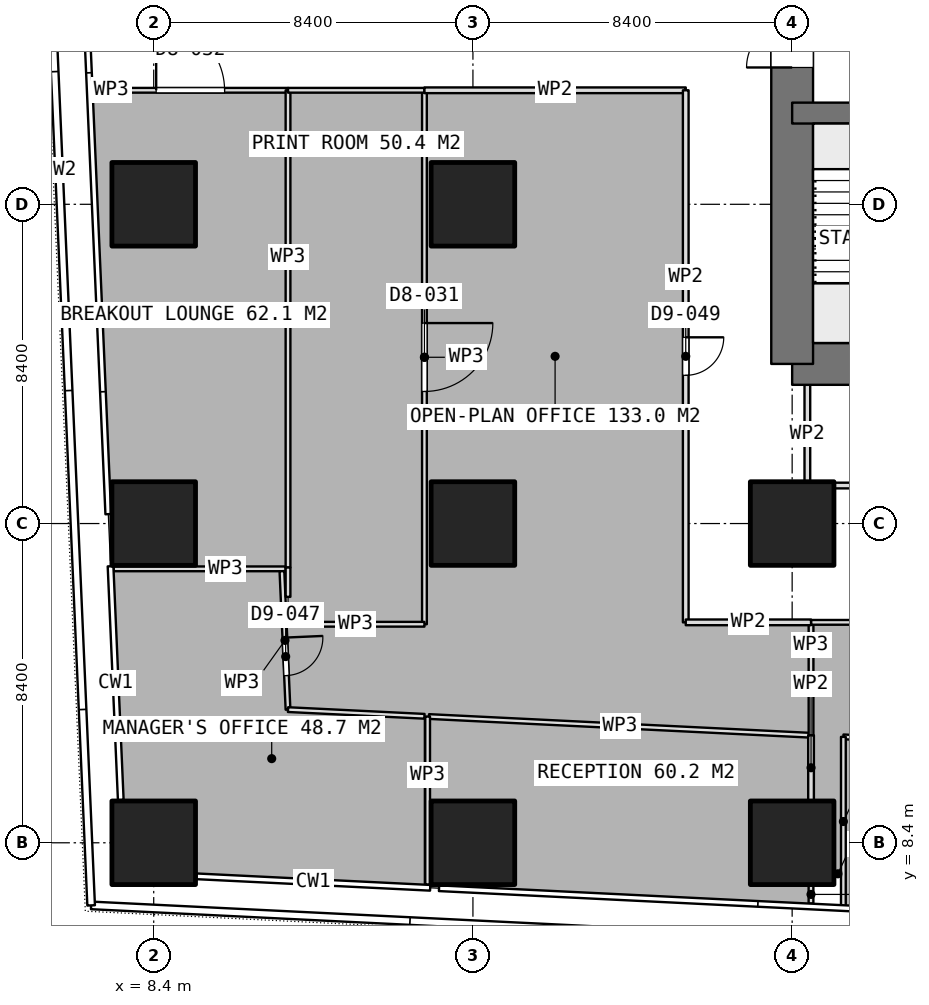
"""IFC4 building model, lengths in metres.
Left out: names, types, materials, properties, quantities, classifications, styles, units other than length and angle.
Written with IfcOpenShell. Run it as: python <this file> out.ifc"""

import sys

from ifc_helpers import new_model, si_unit, direction, frame, frame_2d, origin, origin_2d, place, context, subcontext, project, spatial, rectangle, extrude, element, fill, save


model = new_model("IFC4")
c1 = context("Model", 3, precision=1e-05, world=origin(), true_north=direction((0.0, 1.0)))
c2 = subcontext(c1, "Body", "Model", "MODEL_VIEW")
j1 = project(units=[si_unit("LENGTHUNIT", "METRE"), si_unit("PLANEANGLEUNIT", "RADIAN")], contexts=[c1])
p1 = place(None, origin())
s1 = spatial("IfcSite", under=j1, at=p1, CompositionType="ELEMENT")
p2 = place(p1, origin())
s2 = spatial("IfcBuilding", under=s1, at=p2, CompositionType="ELEMENT")
p3 = place(p2, frame((0.0, 0.0, 32.9)))
s3 = spatial("IfcBuildingStorey", under=s2, at=p3, CompositionType="ELEMENT", Elevation=32.9)
p4 = place(p3, frame((25.2, 21.0, 0.0), z_axis=(0.0, 0.0, 1.0), x_axis=(1.0, 0.0, 0.0)))
e1 = element("IfcWall", 1, at=p4, inside=s3, PredefinedType="SHEAR", context=c2, shape_type="SweptSolid", body=[
    extrude(rectangle(XDim=10.4, YDim=1.1, at=frame_2d((5.2, 0.0))), origin(), (0.0, 0.0, 1.0), 3.75),
])
p5 = place(p3, frame((25.2, 21.0, 0.0), z_axis=(0.0, 0.0, 1.0), x_axis=(0.0, 1.0, 0.0)))
e2 = element("IfcWall", 2, at=p5, inside=s3, PredefinedType="SHEAR", context=c2, shape_type="SweptSolid", body=[
    extrude(rectangle(XDim=25.2, YDim=1.1, at=frame_2d((12.6, 0.0))), origin(), (0.0, 0.0, 1.0), 3.75),
])
p6 = place(p5, frame((7.8, 0.0, 0.0)))
e3 = element("IfcOpeningElement", 3, at=p6, cuts=e2, PredefinedType="OPENING", context=c2, shape_type="SweptSolid", body=[
    extrude(rectangle(XDim=1.2, YDim=2.1, at=frame_2d((0.6, 1.05))), frame((0.0, 0.56, 0.0), z_axis=(0.0, -1.0, 0.0), x_axis=(1.0, 0.0, 0.0)), (0.0, 0.0, 1.0), 1.12),
])
p7 = place(p5, frame((14.25, 0.0, 0.0)))
e4 = element("IfcOpeningElement", 4, at=p7, cuts=e2, PredefinedType="OPENING", context=c2, shape_type="SweptSolid", body=[
    extrude(rectangle(XDim=0.9, YDim=2.1, at=frame_2d((0.45, 1.05))), frame((0.0, 0.56, 0.0), z_axis=(0.0, -1.0, 0.0), x_axis=(1.0, 0.0, 0.0)), (0.0, 0.0, 1.0), 1.12),
])
p8 = place(p5, frame((16.85, 0.0, 0.0)))
e5 = element("IfcOpeningElement", 5, at=p8, cuts=e2, PredefinedType="OPENING", context=c2, shape_type="SweptSolid", body=[
    extrude(rectangle(XDim=0.9, YDim=2.1, at=frame_2d((0.45, 1.05))), frame((0.0, 0.56, 0.0), z_axis=(0.0, -1.0, 0.0), x_axis=(1.0, 0.0, 0.0)), (0.0, 0.0, 1.0), 1.12),
])
p9 = place(p5, frame((19.075, 0.0, 0.0)))
e6 = element("IfcOpeningElement", 6, at=p9, cuts=e2, PredefinedType="OPENING", context=c2, shape_type="SweptSolid", body=[
    extrude(rectangle(XDim=1.2, YDim=2.1, at=frame_2d((0.6, 1.05))), frame((0.0, 0.56, 0.0), z_axis=(0.0, -1.0, 0.0), x_axis=(1.0, 0.0, 0.0)), (0.0, 0.0, 1.0), 1.12),
])
p10 = place(p3, frame((25.2, 27.6, 0.0), z_axis=(0.0, 0.0, 1.0), x_axis=(1.0, 0.0, 0.0)))
e7 = element("IfcWall", 7, at=p10, inside=s3, PredefinedType="SHEAR", context=c2, shape_type="SweptSolid", body=[
    extrude(rectangle(XDim=6.6, YDim=0.55, at=frame_2d((3.3, 0.0))), origin(), (0.0, 0.0, 1.0), 3.75),
])
p11 = place(p10, frame((4.925, 0.0, 0.0)))
e8 = element("IfcOpeningElement", 8, at=p11, cuts=e7, PredefinedType="OPENING", context=c2, shape_type="SweptSolid", body=[
    extrude(rectangle(XDim=1.2, YDim=2.1, at=frame_2d((0.6, 1.05))), frame((0.0, 0.285, 0.0), z_axis=(0.0, -1.0, 0.0), x_axis=(1.0, 0.0, 0.0)), (0.0, 0.0, 1.0), 0.57),
])
for number, where, z_axis, x_axis in (
    (9, (8.4, 8.4, 0.0), (0.0, 0.0, 1.0), (1.0, 0.0, 0.0)),
    (10, (8.4, 16.8, 0.0), (0.0, 0.0, 1.0), (1.0, 0.0, 0.0)),
    (11, (8.4, 25.2, 0.0), (0.0, 0.0, 1.0), (1.0, 0.0, 0.0)),
    (12, (16.8, 8.4, 0.0), (0.0, 0.0, 1.0), (1.0, 0.0, 0.0)),
    (13, (16.8, 16.8, 0.0), (0.0, 0.0, 1.0), (1.0, 0.0, 0.0)),
    (14, (16.8, 25.2, 0.0), (0.0, 0.0, 1.0), (1.0, 0.0, 0.0)),
    (15, (25.2, 8.4, 0.0), (0.0, 0.0, 1.0), (1.0, 0.0, 0.0)),
    (16, (25.2, 16.8, 0.0), (0.0, 0.0, 1.0), (1.0, 0.0, 0.0)),
):
    element("IfcColumn", number, at=place(p3, frame(where, z_axis=z_axis, x_axis=x_axis)), inside=s3, PredefinedType="COLUMN", context=c2, shape_type="SweptSolid", body=[
        extrude(rectangle(XDim=2.2, YDim=2.2, at=origin_2d()), origin(), (0.0, 0.0, 1.0), 3.75),
    ])
p12 = place(p3, frame((25.525, 17.8, 0.0), z_axis=(0.0, 0.0, 1.0), x_axis=(1.0, 0.0, 0.0)))
e17 = element("IfcWall", 17, at=p12, inside=s3, PredefinedType="PARTITIONING", context=c2, shape_type="SweptSolid", body=[
    extrude(rectangle(XDim=9.75, YDim=0.15, at=frame_2d((4.875, 0.0))), origin(), (0.0, 0.0, 1.0), 3.5),
])
p13 = place(p12, frame((4.375, 0.0, 0.0)))
e18 = element("IfcOpeningElement", 18, at=p13, cuts=e17, PredefinedType="OPENING", context=c2, shape_type="SweptSolid", body=[
    extrude(rectangle(XDim=1.0, YDim=2.1, at=frame_2d((0.5, 1.05))), frame((0.0, 0.085, 0.0), z_axis=(0.0, -1.0, 0.0), x_axis=(1.0, 0.0, 0.0)), (0.0, 0.0, 1.0), 0.17),
])
p14 = place(p3, frame((25.6, 17.875, 0.0), z_axis=(0.0, 0.0, 1.0), x_axis=(0.0, 1.0, 0.0)))
e19 = element("IfcWall", 19, at=p14, inside=s3, PredefinedType="PARTITIONING", context=c2, shape_type="SweptSolid", body=[
    extrude(rectangle(XDim=2.575, YDim=0.15, at=frame_2d((1.288, 0.0))), origin(), (0.0, 0.0, 1.0), 3.5),
])
p15 = place(p3, frame((26.548, 11.187, 0.0), z_axis=(0.0, 0.0, 1.0), x_axis=(0.998797680893, -0.049022368804, 0.0)))
e20 = element("IfcWall", 20, at=p15, inside=s3, PredefinedType="PARTITIONING", context=c2, shape_type="SweptSolid", body=[
    extrude(rectangle(XDim=8.302, YDim=0.125, at=frame_2d((4.151, 0.0))), origin(), (0.0, 0.0, 1.0), 3.5),
])
p16 = place(p15, frame((3.291, 0.0, 0.0)))
e21 = element("IfcOpeningElement", 21, at=p16, cuts=e20, PredefinedType="OPENING", context=c2, shape_type="SweptSolid", body=[
    extrude(rectangle(XDim=1.0, YDim=2.1, at=frame_2d((0.5, 1.05))), frame((0.0, 0.073, 0.0), z_axis=(0.0, -1.0, 0.0), x_axis=(1.0, 0.0, 0.0)), (0.0, 0.0, 1.0), 0.145),
])
p17 = place(p3, frame((26.548, 6.732, 0.0), z_axis=(0.0, 0.0, 1.0), x_axis=(0.0, 1.0, 0.0)))
e22 = element("IfcWall", 22, at=p17, inside=s3, PredefinedType="PARTITIONING", context=c2, shape_type="SweptSolid", body=[
    extrude(rectangle(XDim=4.455, YDim=0.125, at=frame_2d((2.228, 0.0))), origin(), (0.0, 0.0, 1.0), 3.5),
])
p18 = place(p3, frame((15.643, 11.722, 0.0), z_axis=(0.0, 0.0, 1.0), x_axis=(0.998800316201, -0.048968646667, 0.0)))
e23 = element("IfcWall", 23, at=p18, inside=s3, PredefinedType="PARTITIONING", context=c2, shape_type="SweptSolid", body=[
    extrude(rectangle(XDim=10.066, YDim=0.125, at=frame_2d((5.033, 0.0))), origin(), (0.0, 0.0, 1.0), 3.5),
])
p19 = place(p3, frame((25.697, 11.229, 0.0), z_axis=(0.0, 0.0, 1.0), x_axis=(0.0, 1.0, 0.0)))
e24 = element("IfcWall", 24, at=p19, inside=s3, PredefinedType="PARTITIONING", context=c2, shape_type="SweptSolid", body=[
    extrude(rectangle(XDim=2.971, YDim=0.125, at=frame_2d((1.485, 0.0))), origin(), (0.0, 0.0, 1.0), 3.5),
])
p20 = place(p3, frame((25.697, 14.2, 0.0), z_axis=(0.0, 0.0, 1.0), x_axis=(1.0, 0.0, 0.0)))
e25 = element("IfcWall", 25, at=p20, inside=s3, PredefinedType="PARTITIONING", context=c2, shape_type="SweptSolid", body=[
    extrude(rectangle(XDim=5.303, YDim=0.125, at=frame_2d((2.651, 0.0))), origin(), (0.0, 0.0, 1.0), 3.5),
])
p21 = place(p20, frame((1.752, 0.0, 0.0)))
e26 = element("IfcOpeningElement", 26, at=p21, cuts=e25, PredefinedType="OPENING", context=c2, shape_type="SweptSolid", body=[
    extrude(rectangle(XDim=1.8, YDim=2.1, at=frame_2d((0.9, 1.05))), frame((0.0, 0.073, 0.0), z_axis=(0.0, -1.0, 0.0), x_axis=(1.0, 0.0, 0.0)), (0.0, 0.0, 1.0), 0.145),
])
p22 = place(p3, frame((26.485, 7.584, 0.0), z_axis=(0.0, 0.0, 1.0), x_axis=(-1.0, 0.0, 0.0)))
e27 = element("IfcWall", 27, at=p22, inside=s3, PredefinedType="PARTITIONING", context=c2, shape_type="SweptSolid", body=[
    extrude(rectangle(XDim=0.165, YDim=0.125, at=frame_2d((0.083, 0.0))), origin(), (0.0, 0.0, 1.0), 3.5),
])
p23 = place(p3, frame((25.696, 7.28, 0.0), z_axis=(0.0, 0.0, 1.0), x_axis=(0.0, -1.0, 0.0)))
e28 = element("IfcWall", 28, at=p23, inside=s3, PredefinedType="PARTITIONING", context=c2, shape_type="SweptSolid", body=[
    extrude(rectangle(XDim=0.477, YDim=0.125, at=frame_2d((0.239, 0.0))), origin(), (0.0, 0.0, 1.0), 3.5),
])
p24 = place(p3, frame((15.608, 7.299, 0.0), z_axis=(0.0, 0.0, 1.0), x_axis=(0.0, 1.0, 0.0)))
e29 = element("IfcWall", 29, at=p24, inside=s3, PredefinedType="PARTITIONING", context=c2, shape_type="SweptSolid", body=[
    extrude(rectangle(XDim=4.423, YDim=0.125, at=frame_2d((2.211, 0.0))), origin(), (0.0, 0.0, 1.0), 3.5),
])
p25 = place(p3, frame((6.767, 28.2, 0.0), z_axis=(0.0, 0.0, 1.0), x_axis=(1.0, 0.0, 0.0)))
e30 = element("IfcWall", 30, at=p25, inside=s3, PredefinedType="PARTITIONING", context=c2, shape_type="SweptSolid", body=[
    extrude(rectangle(XDim=5.167, YDim=0.125, at=frame_2d((2.583, 0.0))), origin(), (0.0, 0.0, 1.0), 3.5),
])
p26 = place(p25, frame((1.698, 0.0, 0.0)))
e31 = element("IfcOpeningElement", 31, at=p26, cuts=e30, PredefinedType="OPENING", context=c2, shape_type="SweptSolid", body=[
    extrude(rectangle(XDim=1.8, YDim=2.1, at=frame_2d((0.9, 1.05))), frame((0.0, 0.073, 0.0), z_axis=(0.0, -1.0, 0.0), x_axis=(1.0, 0.0, 0.0)), (0.0, 0.0, 1.0), 0.145),
])
p27 = place(p3, frame((11.934, 28.2, 0.0), z_axis=(0.0, 0.0, 1.0), x_axis=(0.0, -1.0, 0.0)))
e32 = element("IfcWall", 32, at=p27, inside=s3, PredefinedType="PARTITIONING", context=c2, shape_type="SweptSolid", body=[
    extrude(rectangle(XDim=12.557, YDim=0.125, at=frame_2d((6.278, 0.0))), origin(), (0.0, 0.0, 1.0), 3.5),
])
p28 = place(p3, frame((11.871, 15.608, 0.0), z_axis=(0.0, 0.0, 1.0), x_axis=(-1.0, 0.0, 0.0)))
e33 = element("IfcWall", 33, at=p28, inside=s3, PredefinedType="PARTITIONING", context=c2, shape_type="SweptSolid", body=[
    extrude(rectangle(XDim=4.524, YDim=0.125, at=frame_2d((2.262, 0.0))), origin(), (0.0, 0.0, 1.0), 3.5),
])
p29 = place(p3, frame((11.774, 15.546, 0.0), z_axis=(0.0, 0.0, 1.0), x_axis=(0.043934208205, -0.999034426509, 0.0)))
e34 = element("IfcWall", 34, at=p29, inside=s3, PredefinedType="PARTITIONING", context=c2, shape_type="SweptSolid", body=[
    extrude(rectangle(XDim=3.645, YDim=0.125, at=frame_2d((1.823, 0.0))), origin(), (0.0, 0.0, 1.0), 3.5),
])
p30 = place(p29, frame((1.749, 0.0, 0.0)))
e35 = element("IfcOpeningElement", 35, at=p30, cuts=e34, PredefinedType="OPENING", context=c2, shape_type="SweptSolid", body=[
    extrude(rectangle(XDim=1.0, YDim=2.1, at=frame_2d((0.5, 1.05))), frame((0.0, 0.073, 0.0), z_axis=(0.0, -1.0, 0.0), x_axis=(1.0, 0.0, 0.0)), (0.0, 0.0, 1.0), 0.145),
])
p31 = place(p3, frame((11.934, 11.904, 0.0), z_axis=(0.0, 0.0, 1.0), x_axis=(0.998799983391, -0.048975434441, 0.0)))
e36 = element("IfcWall", 36, at=p31, inside=s3, PredefinedType="PARTITIONING", context=c2, shape_type="SweptSolid", body=[
    extrude(rectangle(XDim=3.594, YDim=0.125, at=frame_2d((1.797, 0.0))), origin(), (0.0, 0.0, 1.0), 3.5),
])
p32 = place(p3, frame((15.524, 28.2, 0.0), z_axis=(0.0, 0.0, 1.0), x_axis=(0.0, -1.0, 0.0)))
e37 = element("IfcWall", 37, at=p32, inside=s3, PredefinedType="PARTITIONING", context=c2, shape_type="SweptSolid", body=[
    extrude(rectangle(XDim=14.05, YDim=0.125, at=frame_2d((7.025, 0.0))), origin(), (0.0, 0.0, 1.0), 3.5),
])
p33 = place(p32, frame((6.125, 0.0, 0.0)))
e38 = element("IfcOpeningElement", 38, at=p33, cuts=e37, PredefinedType="OPENING", context=c2, shape_type="SweptSolid", body=[
    extrude(rectangle(XDim=1.8, YDim=2.1, at=frame_2d((0.9, 1.05))), frame((0.0, 0.073, 0.0), z_axis=(0.0, -1.0, 0.0), x_axis=(1.0, 0.0, 0.0)), (0.0, 0.0, 1.0), 0.145),
])
p34 = place(p3, frame((15.524, 14.15, 0.0), z_axis=(0.0, 0.0, 1.0), x_axis=(-1.0, 0.0, 0.0)))
e39 = element("IfcWall", 39, at=p34, inside=s3, PredefinedType="PARTITIONING", context=c2, shape_type="SweptSolid", body=[
    extrude(rectangle(XDim=3.626, YDim=0.125, at=frame_2d((1.813, 0.0))), origin(), (0.0, 0.0, 1.0), 3.5),
])
p35 = place(p3, frame((11.934, 14.871, 0.0), z_axis=(0.0, 0.0, 1.0), x_axis=(0.0, 1.0, 0.0)))
e40 = element("IfcWall", 40, at=p35, inside=s3, PredefinedType="PARTITIONING", context=c2, shape_type="SweptSolid", body=[
    extrude(rectangle(XDim=0.772, YDim=0.125, at=frame_2d((0.386, 0.0))), origin(), (0.0, 0.0, 1.0), 3.5),
])
p36 = place(p3, frame((11.934, 28.2, 0.0), z_axis=(0.0, 0.0, 1.0), x_axis=(1.0, 0.0, 0.0)))
e41 = element("IfcWall", 41, at=p36, inside=s3, PredefinedType="PARTITIONING", context=c2, shape_type="SweptSolid", body=[
    extrude(rectangle(XDim=3.59, YDim=0.125, at=frame_2d((1.795, 0.0))), origin(), (0.0, 0.0, 1.0), 3.5),
])
p37 = place(p3, frame((15.524, 28.2, 0.0), z_axis=(0.0, 0.0, 1.0), x_axis=(1.0, 0.0, 0.0)))
e42 = element("IfcWall", 42, at=p37, inside=s3, PredefinedType="PARTITIONING", context=c2, shape_type="SweptSolid", body=[
    extrude(rectangle(XDim=6.876, YDim=0.15, at=frame_2d((3.438, 0.0))), origin(), (0.0, 0.0, 1.0), 3.5),
])
p38 = place(p3, frame((22.4, 28.2, 0.0), z_axis=(0.0, 0.0, 1.0), x_axis=(0.0, -1.0, 0.0)))
e43 = element("IfcWall", 43, at=p38, inside=s3, PredefinedType="PARTITIONING", context=c2, shape_type="SweptSolid", body=[
    extrude(rectangle(XDim=14.0, YDim=0.15, at=frame_2d((7.0, 0.0))), origin(), (0.0, 0.0, 1.0), 3.5),
])
p39 = place(p38, frame((6.5, 0.0, 0.0)))
e44 = element("IfcOpeningElement", 44, at=p39, cuts=e43, PredefinedType="OPENING", context=c2, shape_type="SweptSolid", body=[
    extrude(rectangle(XDim=1.0, YDim=2.1, at=frame_2d((0.5, 1.05))), frame((0.0, 0.085, 0.0), z_axis=(0.0, -1.0, 0.0), x_axis=(1.0, 0.0, 0.0)), (0.0, 0.0, 1.0), 0.17),
])
p40 = place(p3, frame((22.4, 14.2, 0.0), z_axis=(0.0, 0.0, 1.0), x_axis=(1.0, 0.0, 0.0)))
e45 = element("IfcWall", 45, at=p40, inside=s3, PredefinedType="PARTITIONING", context=c2, shape_type="SweptSolid", body=[
    extrude(rectangle(XDim=3.297, YDim=0.15, at=frame_2d((1.648, 0.0))), origin(), (0.0, 0.0, 1.0), 3.5),
])
p41 = place(p3, frame((25.697, 11.229, 0.0), z_axis=(0.0, 0.0, 1.0), x_axis=(0.0, -1.0, 0.0)))
e46 = element("IfcWall", 46, at=p41, inside=s3, PredefinedType="PARTITIONING", context=c2, shape_type="SweptSolid", body=[
    extrude(rectangle(XDim=1.709, YDim=0.15, at=frame_2d((0.854, 0.0))), origin(), (0.0, 0.0, 1.0), 3.5),
])
p42 = place(p6, origin())
e47 = element("IfcDoor", 47, at=p42, inside=s3, OperationType="SINGLE_SWING_LEFT", PredefinedType="DOOR", context=c2, shape_type="SweptSolid", body=[
    extrude(rectangle(XDim=1.2, YDim=2.1, at=frame_2d((0.6, 1.05))), frame((0.0, 0.025, 0.0), z_axis=(0.0, -1.0, 0.0), x_axis=(1.0, 0.0, 0.0)), (0.0, 0.0, 1.0), 0.05),
])
fill(e3, e47)
p43 = place(p26, origin())
e48 = element("IfcDoor", 48, at=p43, inside=s3, OperationType="DOUBLE_DOOR_SINGLE_SWING", PredefinedType="DOOR", context=c2, shape_type="SweptSolid", body=[
    extrude(rectangle(XDim=1.8, YDim=2.1, at=frame_2d((0.9, 1.05))), frame((0.0, 0.025, 0.0), z_axis=(0.0, -1.0, 0.0), x_axis=(1.0, 0.0, 0.0)), (0.0, 0.0, 1.0), 0.05),
])
fill(e31, e48)
p44 = place(p30, origin())
e49 = element("IfcDoor", 49, at=p44, inside=s3, OperationType="SINGLE_SWING_LEFT", PredefinedType="DOOR", context=c2, shape_type="SweptSolid", body=[
    extrude(rectangle(XDim=1.0, YDim=2.1, at=frame_2d((0.5, 1.05))), frame((0.0, 0.025, 0.0), z_axis=(0.0, -1.0, 0.0), x_axis=(1.0, 0.0, 0.0)), (0.0, 0.0, 1.0), 0.05),
])
fill(e35, e49)
p45 = place(p33, origin())
e50 = element("IfcDoor", 50, at=p45, inside=s3, OperationType="DOUBLE_DOOR_SINGLE_SWING", PredefinedType="DOOR", context=c2, shape_type="SweptSolid", body=[
    extrude(rectangle(XDim=1.8, YDim=2.1, at=frame_2d((0.9, 1.05))), frame((0.0, 0.025, 0.0), z_axis=(0.0, -1.0, 0.0), x_axis=(1.0, 0.0, 0.0)), (0.0, 0.0, 1.0), 0.05),
])
fill(e38, e50)
p46 = place(p39, origin())
e51 = element("IfcDoor", 51, at=p46, inside=s3, OperationType="SINGLE_SWING_LEFT", PredefinedType="DOOR", context=c2, shape_type="SweptSolid", body=[
    extrude(rectangle(XDim=1.0, YDim=2.1, at=frame_2d((0.5, 1.05))), frame((0.0, 0.025, 0.0), z_axis=(0.0, -1.0, 0.0), x_axis=(1.0, 0.0, 0.0)), (0.0, 0.0, 1.0), 0.05),
])
fill(e44, e51)
save(model, sys.argv[1])
